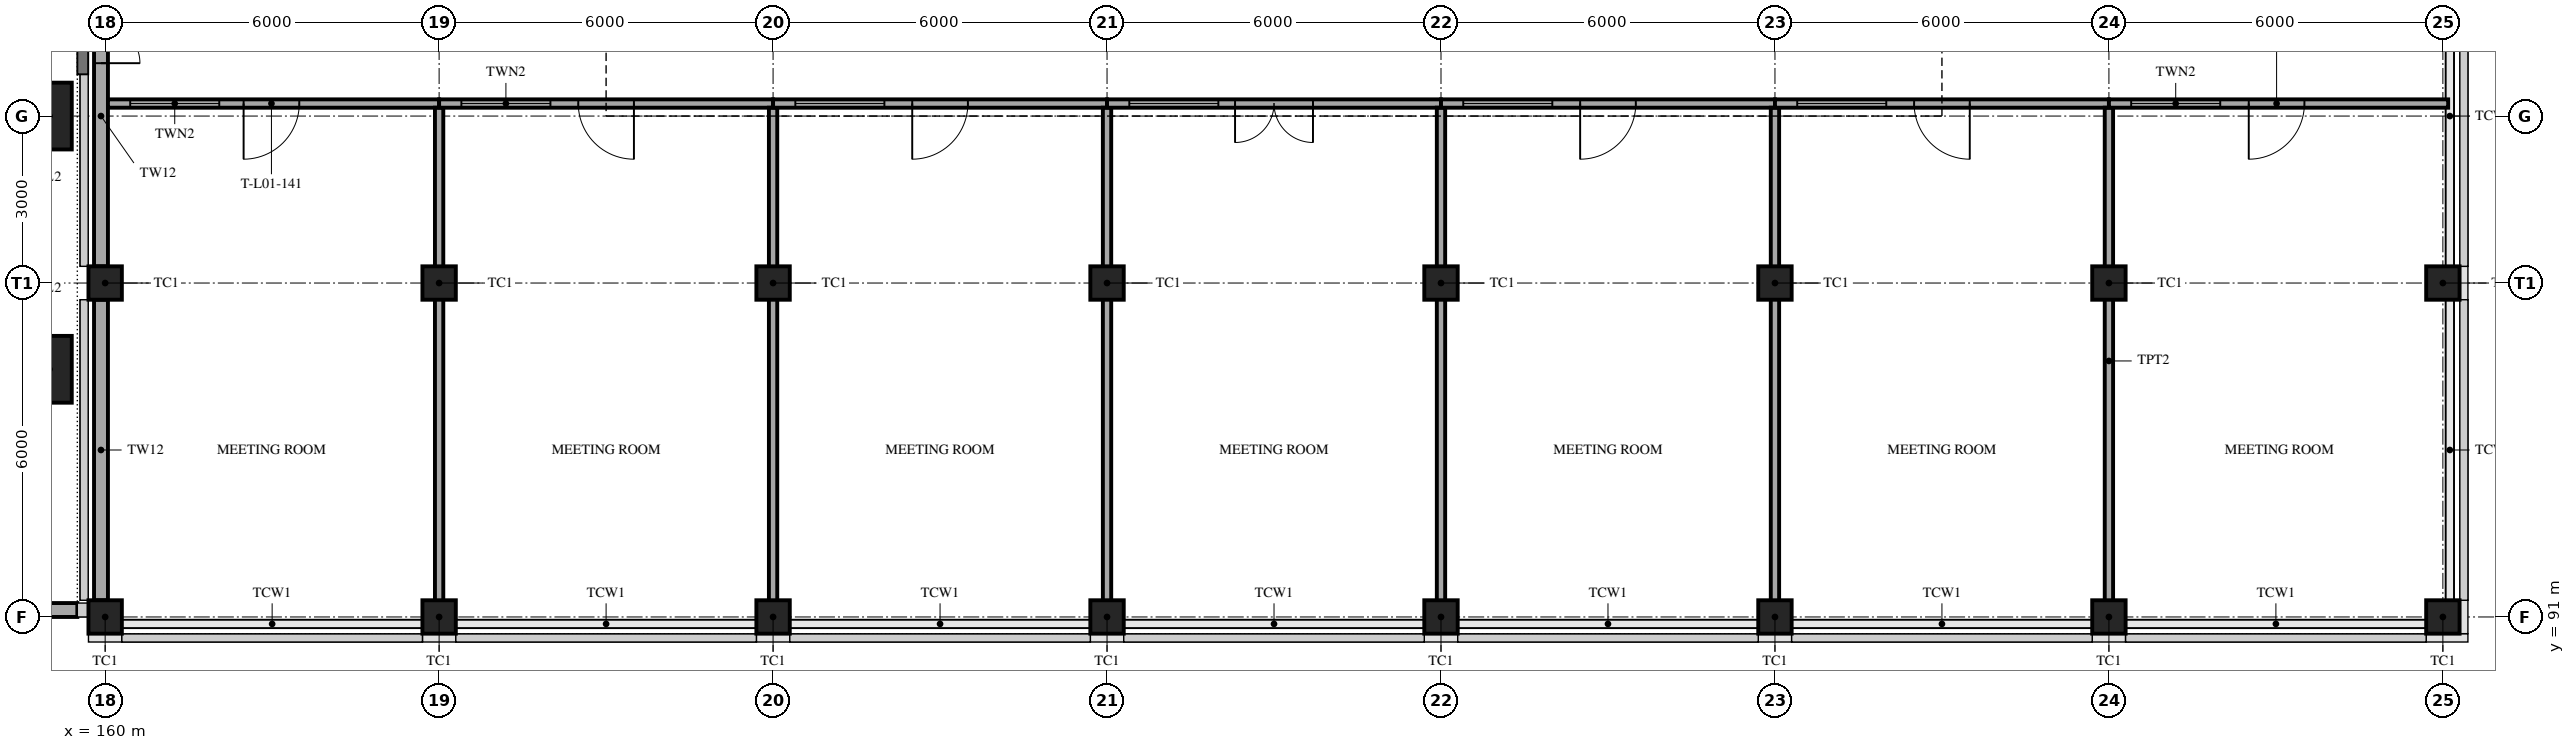
"""IFC4 building model, lengths in metres.
Left out: names, types, materials, properties, quantities, classifications, styles, units other than length and angle.
Written with IfcOpenShell. Run it as: python <this file> out.ifc"""

import sys

from ifc_helpers import new_model, si_unit, direction, frame, frame_2d, origin, origin_2d, place, context, subcontext, project, spatial, rectangle, hollow_rectangle, extrude, element, fill, save


model = new_model("IFC4")
c1 = context("Model", 3, precision=1e-05, world=origin(), true_north=direction((0.0, 1.0)))
c2 = subcontext(c1, "Body", "Model", "MODEL_VIEW")
j1 = project(units=[si_unit("LENGTHUNIT", "METRE"), si_unit("PLANEANGLEUNIT", "RADIAN")], contexts=[c1])
p1 = place(None, origin())
s1 = spatial("IfcSite", under=j1, at=p1, CompositionType="ELEMENT")
p2 = place(p1, origin())
s2 = spatial("IfcBuilding", under=s1, at=p2, CompositionType="ELEMENT")
p3 = place(p2, frame((0.0, 0.0, 5.0)))
s3 = spatial("IfcBuildingStorey", under=s2, at=p3, CompositionType="ELEMENT", Elevation=5.0)
for number, where, z_axis, x_axis in (
    (1, (160.0, 91.0, 0.0), (0.0, 0.0, 1.0), (1.0, 0.0, 0.0)),
    (2, (160.0, 97.0, 0.0), (0.0, 0.0, 1.0), (1.0, 0.0, 0.0)),
    (3, (166.0, 91.0, 0.0), (0.0, 0.0, 1.0), (1.0, 0.0, 0.0)),
    (4, (172.0, 91.0, 0.0), (0.0, 0.0, 1.0), (1.0, 0.0, 0.0)),
    (5, (178.0, 91.0, 0.0), (0.0, 0.0, 1.0), (1.0, 0.0, 0.0)),
    (6, (184.0, 91.0, 0.0), (0.0, 0.0, 1.0), (1.0, 0.0, 0.0)),
    (7, (190.0, 91.0, 0.0), (0.0, 0.0, 1.0), (1.0, 0.0, 0.0)),
    (8, (196.0, 91.0, 0.0), (0.0, 0.0, 1.0), (1.0, 0.0, 0.0)),
    (9, (202.0, 91.0, 0.0), (0.0, 0.0, 1.0), (1.0, 0.0, 0.0)),
    (10, (202.0, 97.0, 0.0), (0.0, 0.0, 1.0), (1.0, 0.0, 0.0)),
    (11, (166.0, 97.0, 0.0), (0.0, 0.0, 1.0), (1.0, 0.0, 0.0)),
    (12, (172.0, 97.0, 0.0), (0.0, 0.0, 1.0), (1.0, 0.0, 0.0)),
    (13, (178.0, 97.0, 0.0), (0.0, 0.0, 1.0), (1.0, 0.0, 0.0)),
    (14, (184.0, 97.0, 0.0), (0.0, 0.0, 1.0), (1.0, 0.0, 0.0)),
    (15, (190.0, 97.0, 0.0), (0.0, 0.0, 1.0), (1.0, 0.0, 0.0)),
    (16, (196.0, 97.0, 0.0), (0.0, 0.0, 1.0), (1.0, 0.0, 0.0)),
):
    element("IfcColumn", number, at=place(p3, frame(where, z_axis=z_axis, x_axis=x_axis)), inside=s3, PredefinedType="COLUMN", context=c2, shape_type="SweptSolid", body=[
        extrude(hollow_rectangle(XDim=0.6, YDim=0.6, WallThickness=0.04, at=origin_2d()), origin(), (0.0, 0.0, 1.0), 5.0),
    ])
for number, where, z_axis, x_axis in (
    (17, (159.0, 95.45, 0.0), (0.0, 0.0, 1.0), (1.0, 0.0, 0.0)),
    (18, (159.0, 100.0, 0.0), (0.0, 0.0, 1.0), (1.0, 0.0, 0.0)),
):
    element("IfcColumn", number, at=place(p3, frame(where, z_axis=z_axis, x_axis=x_axis)), inside=s3, PredefinedType="COLUMN", context=c2, shape_type="SweptSolid", body=[
        extrude(rectangle(XDim=0.8, YDim=1.2, at=origin_2d()), origin(), (0.0, 0.0, 1.0), 5.0),
    ])
p4 = place(p3, frame((159.925, 91.3, 0.0), z_axis=(0.0, 0.0, 1.0), x_axis=(0.0, 1.0, 0.0)))
e19 = element("IfcWall", 19, at=p4, inside=s3, PredefinedType="SOLIDWALL", context=c2, shape_type="SweptSolid", body=[
    extrude(rectangle(XDim=5.4, YDim=0.25, at=frame_2d((2.7, 0.0))), origin(), (0.0, 0.0, 1.0), 4.35),
])
p5 = place(p3, frame((159.925, 97.3, 0.0), z_axis=(0.0, 0.0, 1.0), x_axis=(0.0, 1.0, 0.0)))
e20 = element("IfcWall", 20, at=p5, inside=s3, PredefinedType="SOLIDWALL", context=c2, shape_type="SweptSolid", body=[
    extrude(rectangle(XDim=5.4, YDim=0.25, at=frame_2d((2.7, 0.0))), origin(), (0.0, 0.0, 1.0), 4.35),
])
p6 = place(p5, frame((3.65, 0.0, 0.0)))
e21 = element("IfcOpeningElement", 21, at=p6, cuts=e20, PredefinedType="OPENING", context=c2, shape_type="SweptSolid", body=[
    extrude(rectangle(XDim=1.4, YDim=2.1, at=frame_2d((0.7, 1.05))), frame((0.0, 0.135, 0.0), z_axis=(0.0, -1.0, 0.0), x_axis=(1.0, 0.0, 0.0)), (0.0, 0.0, 1.0), 0.27),
])
p7 = place(p3, frame((152.45, 91.125, 0.0), z_axis=(0.0, 0.0, 1.0), x_axis=(1.0, 0.0, 0.0)))
e22 = element("IfcWall", 22, at=p7, inside=s3, PredefinedType="SOLIDWALL", context=c2, shape_type="SweptSolid", body=[
    extrude(rectangle(XDim=7.05, YDim=0.25, at=frame_2d((3.525, 0.0))), origin(), (0.0, 0.0, 1.0), 4.59),
])
p8 = place(p3, frame((160.05, 100.225, 0.0), z_axis=(0.0, 0.0, 1.0), x_axis=(1.0, 0.0, 0.0)))
e23 = element("IfcWall", 23, at=p8, inside=s3, PredefinedType="PARTITIONING", context=c2, shape_type="SweptSolid", body=[
    extrude(rectangle(XDim=5.95, YDim=0.15, at=frame_2d((2.975, 0.0))), origin(), (0.0, 0.0, 1.0), 4.2),
])
p9 = place(p8, frame((0.4, 0.0, 0.9)))
e24 = element("IfcOpeningElement", 24, at=p9, cuts=e23, PredefinedType="OPENING", context=c2, shape_type="SweptSolid", body=[
    extrude(rectangle(XDim=1.6, YDim=1.2, at=frame_2d((0.8, 0.6))), frame((0.0, 0.085, 0.0), z_axis=(0.0, -1.0, 0.0), x_axis=(1.0, 0.0, 0.0)), (0.0, 0.0, 1.0), 0.17),
])
p10 = place(p8, frame((2.438, 0.0, 0.0)))
e25 = element("IfcOpeningElement", 25, at=p10, cuts=e23, PredefinedType="OPENING", context=c2, shape_type="SweptSolid", body=[
    extrude(rectangle(XDim=1.0, YDim=2.1, at=frame_2d((0.5, 1.05))), frame((0.0, 0.085, 0.0), z_axis=(0.0, -1.0, 0.0), x_axis=(1.0, 0.0, 0.0)), (0.0, 0.0, 1.0), 0.17),
])
p11 = place(p3, frame((166.0, 91.05, 0.0), z_axis=(0.0, 0.0, 1.0), x_axis=(0.0, 1.0, 0.0)))
e26 = element("IfcWall", 26, at=p11, inside=s3, PredefinedType="PARTITIONING", context=c2, shape_type="SweptSolid", body=[
    extrude(rectangle(XDim=9.1, YDim=0.15, at=frame_2d((4.55, 0.0))), origin(), (0.0, 0.0, 1.0), 4.2),
])
p12 = place(p3, frame((166.0, 100.225, 0.0), z_axis=(0.0, 0.0, 1.0), x_axis=(1.0, 0.0, 0.0)))
e27 = element("IfcWall", 27, at=p12, inside=s3, PredefinedType="PARTITIONING", context=c2, shape_type="SweptSolid", body=[
    extrude(rectangle(XDim=6.0, YDim=0.15, at=frame_2d((3.0, 0.0))), origin(), (0.0, 0.0, 1.0), 4.2),
])
p13 = place(p12, frame((0.4, 0.0, 0.9)))
e28 = element("IfcOpeningElement", 28, at=p13, cuts=e27, PredefinedType="OPENING", context=c2, shape_type="SweptSolid", body=[
    extrude(rectangle(XDim=1.6, YDim=1.2, at=frame_2d((0.8, 0.6))), frame((0.0, 0.085, 0.0), z_axis=(0.0, -1.0, 0.0), x_axis=(1.0, 0.0, 0.0)), (0.0, 0.0, 1.0), 0.17),
])
p14 = place(p12, frame((2.5, 0.0, 0.0)))
e29 = element("IfcOpeningElement", 29, at=p14, cuts=e27, PredefinedType="OPENING", context=c2, shape_type="SweptSolid", body=[
    extrude(rectangle(XDim=1.0, YDim=2.1, at=frame_2d((0.5, 1.05))), frame((0.0, 0.085, 0.0), z_axis=(0.0, -1.0, 0.0), x_axis=(1.0, 0.0, 0.0)), (0.0, 0.0, 1.0), 0.17),
])
p15 = place(p3, frame((172.0, 91.05, 0.0), z_axis=(0.0, 0.0, 1.0), x_axis=(0.0, 1.0, 0.0)))
e30 = element("IfcWall", 30, at=p15, inside=s3, PredefinedType="PARTITIONING", context=c2, shape_type="SweptSolid", body=[
    extrude(rectangle(XDim=9.1, YDim=0.15, at=frame_2d((4.55, 0.0))), origin(), (0.0, 0.0, 1.0), 4.2),
])
p16 = place(p3, frame((172.0, 100.225, 0.0), z_axis=(0.0, 0.0, 1.0), x_axis=(1.0, 0.0, 0.0)))
e31 = element("IfcWall", 31, at=p16, inside=s3, PredefinedType="PARTITIONING", context=c2, shape_type="SweptSolid", body=[
    extrude(rectangle(XDim=6.0, YDim=0.15, at=frame_2d((3.0, 0.0))), origin(), (0.0, 0.0, 1.0), 4.2),
])
p17 = place(p16, frame((0.4, 0.0, 0.9)))
e32 = element("IfcOpeningElement", 32, at=p17, cuts=e31, PredefinedType="OPENING", context=c2, shape_type="SweptSolid", body=[
    extrude(rectangle(XDim=1.6, YDim=1.2, at=frame_2d((0.8, 0.6))), frame((0.0, 0.085, 0.0), z_axis=(0.0, -1.0, 0.0), x_axis=(1.0, 0.0, 0.0)), (0.0, 0.0, 1.0), 0.17),
])
p18 = place(p16, frame((2.5, 0.0, 0.0)))
e33 = element("IfcOpeningElement", 33, at=p18, cuts=e31, PredefinedType="OPENING", context=c2, shape_type="SweptSolid", body=[
    extrude(rectangle(XDim=1.0, YDim=2.1, at=frame_2d((0.5, 1.05))), frame((0.0, 0.085, 0.0), z_axis=(0.0, -1.0, 0.0), x_axis=(1.0, 0.0, 0.0)), (0.0, 0.0, 1.0), 0.17),
])
p19 = place(p3, frame((178.0, 91.05, 0.0), z_axis=(0.0, 0.0, 1.0), x_axis=(0.0, 1.0, 0.0)))
e34 = element("IfcWall", 34, at=p19, inside=s3, PredefinedType="PARTITIONING", context=c2, shape_type="SweptSolid", body=[
    extrude(rectangle(XDim=9.1, YDim=0.15, at=frame_2d((4.55, 0.0))), origin(), (0.0, 0.0, 1.0), 4.2),
])
p20 = place(p3, frame((178.0, 100.225, 0.0), z_axis=(0.0, 0.0, 1.0), x_axis=(1.0, 0.0, 0.0)))
e35 = element("IfcWall", 35, at=p20, inside=s3, PredefinedType="PARTITIONING", context=c2, shape_type="SweptSolid", body=[
    extrude(rectangle(XDim=6.0, YDim=0.15, at=frame_2d((3.0, 0.0))), origin(), (0.0, 0.0, 1.0), 4.2),
])
p21 = place(p20, frame((0.4, 0.0, 0.9)))
e36 = element("IfcOpeningElement", 36, at=p21, cuts=e35, PredefinedType="OPENING", context=c2, shape_type="SweptSolid", body=[
    extrude(rectangle(XDim=1.6, YDim=1.2, at=frame_2d((0.8, 0.6))), frame((0.0, 0.085, 0.0), z_axis=(0.0, -1.0, 0.0), x_axis=(1.0, 0.0, 0.0)), (0.0, 0.0, 1.0), 0.17),
])
p22 = place(p20, frame((2.3, 0.0, 0.0)))
e37 = element("IfcOpeningElement", 37, at=p22, cuts=e35, PredefinedType="OPENING", context=c2, shape_type="SweptSolid", body=[
    extrude(rectangle(XDim=1.4, YDim=2.1, at=frame_2d((0.7, 1.05))), frame((0.0, 0.085, 0.0), z_axis=(0.0, -1.0, 0.0), x_axis=(1.0, 0.0, 0.0)), (0.0, 0.0, 1.0), 0.17),
])
p23 = place(p3, frame((184.0, 91.05, 0.0), z_axis=(0.0, 0.0, 1.0), x_axis=(0.0, 1.0, 0.0)))
e38 = element("IfcWall", 38, at=p23, inside=s3, PredefinedType="PARTITIONING", context=c2, shape_type="SweptSolid", body=[
    extrude(rectangle(XDim=9.1, YDim=0.15, at=frame_2d((4.55, 0.0))), origin(), (0.0, 0.0, 1.0), 4.2),
])
p24 = place(p3, frame((184.0, 100.225, 0.0), z_axis=(0.0, 0.0, 1.0), x_axis=(1.0, 0.0, 0.0)))
e39 = element("IfcWall", 39, at=p24, inside=s3, PredefinedType="PARTITIONING", context=c2, shape_type="SweptSolid", body=[
    extrude(rectangle(XDim=6.0, YDim=0.15, at=frame_2d((3.0, 0.0))), origin(), (0.0, 0.0, 1.0), 4.2),
])
p25 = place(p24, frame((0.4, 0.0, 0.9)))
e40 = element("IfcOpeningElement", 40, at=p25, cuts=e39, PredefinedType="OPENING", context=c2, shape_type="SweptSolid", body=[
    extrude(rectangle(XDim=1.6, YDim=1.2, at=frame_2d((0.8, 0.6))), frame((0.0, 0.085, 0.0), z_axis=(0.0, -1.0, 0.0), x_axis=(1.0, 0.0, 0.0)), (0.0, 0.0, 1.0), 0.17),
])
p26 = place(p24, frame((2.5, 0.0, 0.0)))
e41 = element("IfcOpeningElement", 41, at=p26, cuts=e39, PredefinedType="OPENING", context=c2, shape_type="SweptSolid", body=[
    extrude(rectangle(XDim=1.0, YDim=2.1, at=frame_2d((0.5, 1.05))), frame((0.0, 0.085, 0.0), z_axis=(0.0, -1.0, 0.0), x_axis=(1.0, 0.0, 0.0)), (0.0, 0.0, 1.0), 0.17),
])
p27 = place(p3, frame((190.0, 91.05, 0.0), z_axis=(0.0, 0.0, 1.0), x_axis=(0.0, 1.0, 0.0)))
e42 = element("IfcWall", 42, at=p27, inside=s3, PredefinedType="PARTITIONING", context=c2, shape_type="SweptSolid", body=[
    extrude(rectangle(XDim=9.1, YDim=0.15, at=frame_2d((4.55, 0.0))), origin(), (0.0, 0.0, 1.0), 4.2),
])
p28 = place(p3, frame((190.0, 100.225, 0.0), z_axis=(0.0, 0.0, 1.0), x_axis=(1.0, 0.0, 0.0)))
e43 = element("IfcWall", 43, at=p28, inside=s3, PredefinedType="PARTITIONING", context=c2, shape_type="SweptSolid", body=[
    extrude(rectangle(XDim=6.0, YDim=0.15, at=frame_2d((3.0, 0.0))), origin(), (0.0, 0.0, 1.0), 4.2),
])
p29 = place(p28, frame((0.4, 0.0, 0.9)))
e44 = element("IfcOpeningElement", 44, at=p29, cuts=e43, PredefinedType="OPENING", context=c2, shape_type="SweptSolid", body=[
    extrude(rectangle(XDim=1.6, YDim=1.2, at=frame_2d((0.8, 0.6))), frame((0.0, 0.085, 0.0), z_axis=(0.0, -1.0, 0.0), x_axis=(1.0, 0.0, 0.0)), (0.0, 0.0, 1.0), 0.17),
])
p30 = place(p28, frame((2.5, 0.0, 0.0)))
e45 = element("IfcOpeningElement", 45, at=p30, cuts=e43, PredefinedType="OPENING", context=c2, shape_type="SweptSolid", body=[
    extrude(rectangle(XDim=1.0, YDim=2.1, at=frame_2d((0.5, 1.05))), frame((0.0, 0.085, 0.0), z_axis=(0.0, -1.0, 0.0), x_axis=(1.0, 0.0, 0.0)), (0.0, 0.0, 1.0), 0.17),
])
p31 = place(p3, frame((196.0, 91.05, 0.0), z_axis=(0.0, 0.0, 1.0), x_axis=(0.0, 1.0, 0.0)))
e46 = element("IfcWall", 46, at=p31, inside=s3, PredefinedType="PARTITIONING", context=c2, shape_type="SweptSolid", body=[
    extrude(rectangle(XDim=9.1, YDim=0.15, at=frame_2d((4.55, 0.0))), origin(), (0.0, 0.0, 1.0), 4.2),
])
p32 = place(p3, frame((196.0, 100.225, 0.0), z_axis=(0.0, 0.0, 1.0), x_axis=(1.0, 0.0, 0.0)))
e47 = element("IfcWall", 47, at=p32, inside=s3, PredefinedType="PARTITIONING", context=c2, shape_type="SweptSolid", body=[
    extrude(rectangle(XDim=6.095, YDim=0.15, at=frame_2d((3.047, 0.0))), origin(), (0.0, 0.0, 1.0), 4.2),
])
p33 = place(p32, frame((0.4, 0.0, 0.9)))
e48 = element("IfcOpeningElement", 48, at=p33, cuts=e47, PredefinedType="OPENING", context=c2, shape_type="SweptSolid", body=[
    extrude(rectangle(XDim=1.6, YDim=1.2, at=frame_2d((0.8, 0.6))), frame((0.0, 0.085, 0.0), z_axis=(0.0, -1.0, 0.0), x_axis=(1.0, 0.0, 0.0)), (0.0, 0.0, 1.0), 0.17),
])
p34 = place(p32, frame((2.512, 0.0, 0.0)))
e49 = element("IfcOpeningElement", 49, at=p34, cuts=e47, PredefinedType="OPENING", context=c2, shape_type="SweptSolid", body=[
    extrude(rectangle(XDim=1.0, YDim=2.1, at=frame_2d((0.5, 1.05))), frame((0.0, 0.085, 0.0), z_axis=(0.0, -1.0, 0.0), x_axis=(1.0, 0.0, 0.0)), (0.0, 0.0, 1.0), 0.17),
])
p35 = place(p6, frame((1.4, 0.0, 0.0), z_axis=(0.0, 0.0, 1.0), x_axis=(-1.0, 0.0, 0.0)))
e50 = element("IfcDoor", 50, at=p35, inside=s3, OperationType="DOUBLE_DOOR_SINGLE_SWING", PredefinedType="DOOR", context=c2, shape_type="SweptSolid", body=[
    extrude(rectangle(XDim=1.4, YDim=2.1, at=frame_2d((0.7, 1.05))), frame((0.0, 0.025, 0.0), z_axis=(0.0, -1.0, 0.0), x_axis=(1.0, 0.0, 0.0)), (0.0, 0.0, 1.0), 0.05),
])
fill(e21, e50)
p36 = place(p9, origin())
e51 = element("IfcWindow", 51, at=p36, inside=s3, PartitioningType="SINGLE_PANEL", PredefinedType="WINDOW", context=c2, shape_type="SweptSolid", body=[
    extrude(rectangle(XDim=1.6, YDim=1.2, at=frame_2d((0.8, 0.6))), frame((0.0, 0.03, 0.0), z_axis=(0.0, -1.0, 0.0), x_axis=(1.0, 0.0, 0.0)), (0.0, 0.0, 1.0), 0.06),
])
fill(e24, e51)
p37 = place(p13, origin())
e52 = element("IfcWindow", 52, at=p37, inside=s3, PartitioningType="SINGLE_PANEL", PredefinedType="WINDOW", context=c2, shape_type="SweptSolid", body=[
    extrude(rectangle(XDim=1.6, YDim=1.2, at=frame_2d((0.8, 0.6))), frame((0.0, 0.03, 0.0), z_axis=(0.0, -1.0, 0.0), x_axis=(1.0, 0.0, 0.0)), (0.0, 0.0, 1.0), 0.06),
])
fill(e28, e52)
p38 = place(p17, origin())
e53 = element("IfcWindow", 53, at=p38, inside=s3, PartitioningType="SINGLE_PANEL", PredefinedType="WINDOW", context=c2, shape_type="SweptSolid", body=[
    extrude(rectangle(XDim=1.6, YDim=1.2, at=frame_2d((0.8, 0.6))), frame((0.0, 0.03, 0.0), z_axis=(0.0, -1.0, 0.0), x_axis=(1.0, 0.0, 0.0)), (0.0, 0.0, 1.0), 0.06),
])
fill(e32, e53)
p39 = place(p21, origin())
e54 = element("IfcWindow", 54, at=p39, inside=s3, PartitioningType="SINGLE_PANEL", PredefinedType="WINDOW", context=c2, shape_type="SweptSolid", body=[
    extrude(rectangle(XDim=1.6, YDim=1.2, at=frame_2d((0.8, 0.6))), frame((0.0, 0.03, 0.0), z_axis=(0.0, -1.0, 0.0), x_axis=(1.0, 0.0, 0.0)), (0.0, 0.0, 1.0), 0.06),
])
fill(e36, e54)
p40 = place(p25, origin())
e55 = element("IfcWindow", 55, at=p40, inside=s3, PartitioningType="SINGLE_PANEL", PredefinedType="WINDOW", context=c2, shape_type="SweptSolid", body=[
    extrude(rectangle(XDim=1.6, YDim=1.2, at=frame_2d((0.8, 0.6))), frame((0.0, 0.03, 0.0), z_axis=(0.0, -1.0, 0.0), x_axis=(1.0, 0.0, 0.0)), (0.0, 0.0, 1.0), 0.06),
])
fill(e40, e55)
p41 = place(p29, origin())
e56 = element("IfcWindow", 56, at=p41, inside=s3, PartitioningType="SINGLE_PANEL", PredefinedType="WINDOW", context=c2, shape_type="SweptSolid", body=[
    extrude(rectangle(XDim=1.6, YDim=1.2, at=frame_2d((0.8, 0.6))), frame((0.0, 0.03, 0.0), z_axis=(0.0, -1.0, 0.0), x_axis=(1.0, 0.0, 0.0)), (0.0, 0.0, 1.0), 0.06),
])
fill(e44, e56)
p42 = place(p33, origin())
e57 = element("IfcWindow", 57, at=p42, inside=s3, PartitioningType="SINGLE_PANEL", PredefinedType="WINDOW", context=c2, shape_type="SweptSolid", body=[
    extrude(rectangle(XDim=1.6, YDim=1.2, at=frame_2d((0.8, 0.6))), frame((0.0, 0.03, 0.0), z_axis=(0.0, -1.0, 0.0), x_axis=(1.0, 0.0, 0.0)), (0.0, 0.0, 1.0), 0.06),
])
fill(e48, e57)
p43 = place(p10, frame((1.0, 0.0, 0.0), z_axis=(0.0, 0.0, 1.0), x_axis=(-1.0, 0.0, 0.0)))
e58 = element("IfcDoor", 58, at=p43, inside=s3, OperationType="SINGLE_SWING_RIGHT", PredefinedType="DOOR", context=c2, shape_type="SweptSolid", body=[
    extrude(rectangle(XDim=1.0, YDim=2.1, at=frame_2d((0.5, 1.05))), frame((0.0, 0.025, 0.0), z_axis=(0.0, -1.0, 0.0), x_axis=(1.0, 0.0, 0.0)), (0.0, 0.0, 1.0), 0.05),
])
fill(e25, e58)
p44 = place(p14, frame((1.0, 0.0, 0.0), z_axis=(0.0, 0.0, 1.0), x_axis=(-1.0, 0.0, 0.0)))
e59 = element("IfcDoor", 59, at=p44, inside=s3, OperationType="SINGLE_SWING_LEFT", PredefinedType="DOOR", context=c2, shape_type="SweptSolid", body=[
    extrude(rectangle(XDim=1.0, YDim=2.1, at=frame_2d((0.5, 1.05))), frame((0.0, 0.025, 0.0), z_axis=(0.0, -1.0, 0.0), x_axis=(1.0, 0.0, 0.0)), (0.0, 0.0, 1.0), 0.05),
])
fill(e29, e59)
p45 = place(p18, frame((1.0, 0.0, 0.0), z_axis=(0.0, 0.0, 1.0), x_axis=(-1.0, 0.0, 0.0)))
e60 = element("IfcDoor", 60, at=p45, inside=s3, OperationType="SINGLE_SWING_RIGHT", PredefinedType="DOOR", context=c2, shape_type="SweptSolid", body=[
    extrude(rectangle(XDim=1.0, YDim=2.1, at=frame_2d((0.5, 1.05))), frame((0.0, 0.025, 0.0), z_axis=(0.0, -1.0, 0.0), x_axis=(1.0, 0.0, 0.0)), (0.0, 0.0, 1.0), 0.05),
])
fill(e33, e60)
p46 = place(p22, frame((1.4, 0.0, 0.0), z_axis=(0.0, 0.0, 1.0), x_axis=(-1.0, 0.0, 0.0)))
e61 = element("IfcDoor", 61, at=p46, inside=s3, OperationType="DOUBLE_DOOR_SINGLE_SWING", PredefinedType="DOOR", context=c2, shape_type="SweptSolid", body=[
    extrude(rectangle(XDim=1.4, YDim=2.1, at=frame_2d((0.7, 1.05))), frame((0.0, 0.025, 0.0), z_axis=(0.0, -1.0, 0.0), x_axis=(1.0, 0.0, 0.0)), (0.0, 0.0, 1.0), 0.05),
])
fill(e37, e61)
p47 = place(p26, frame((1.0, 0.0, 0.0), z_axis=(0.0, 0.0, 1.0), x_axis=(-1.0, 0.0, 0.0)))
e62 = element("IfcDoor", 62, at=p47, inside=s3, OperationType="SINGLE_SWING_RIGHT", PredefinedType="DOOR", context=c2, shape_type="SweptSolid", body=[
    extrude(rectangle(XDim=1.0, YDim=2.1, at=frame_2d((0.5, 1.05))), frame((0.0, 0.025, 0.0), z_axis=(0.0, -1.0, 0.0), x_axis=(1.0, 0.0, 0.0)), (0.0, 0.0, 1.0), 0.05),
])
fill(e41, e62)
p48 = place(p30, frame((1.0, 0.0, 0.0), z_axis=(0.0, 0.0, 1.0), x_axis=(-1.0, 0.0, 0.0)))
e63 = element("IfcDoor", 63, at=p48, inside=s3, OperationType="SINGLE_SWING_LEFT", PredefinedType="DOOR", context=c2, shape_type="SweptSolid", body=[
    extrude(rectangle(XDim=1.0, YDim=2.1, at=frame_2d((0.5, 1.05))), frame((0.0, 0.025, 0.0), z_axis=(0.0, -1.0, 0.0), x_axis=(1.0, 0.0, 0.0)), (0.0, 0.0, 1.0), 0.05),
])
fill(e45, e63)
p49 = place(p34, frame((1.0, 0.0, 0.0), z_axis=(0.0, 0.0, 1.0), x_axis=(-1.0, 0.0, 0.0)))
e64 = element("IfcDoor", 64, at=p49, inside=s3, OperationType="SINGLE_SWING_RIGHT", PredefinedType="DOOR", context=c2, shape_type="SweptSolid", body=[
    extrude(rectangle(XDim=1.0, YDim=2.1, at=frame_2d((0.5, 1.05))), frame((0.0, 0.025, 0.0), z_axis=(0.0, -1.0, 0.0), x_axis=(1.0, 0.0, 0.0)), (0.0, 0.0, 1.0), 0.05),
])
fill(e49, e64)
save(model, sys.argv[1])
